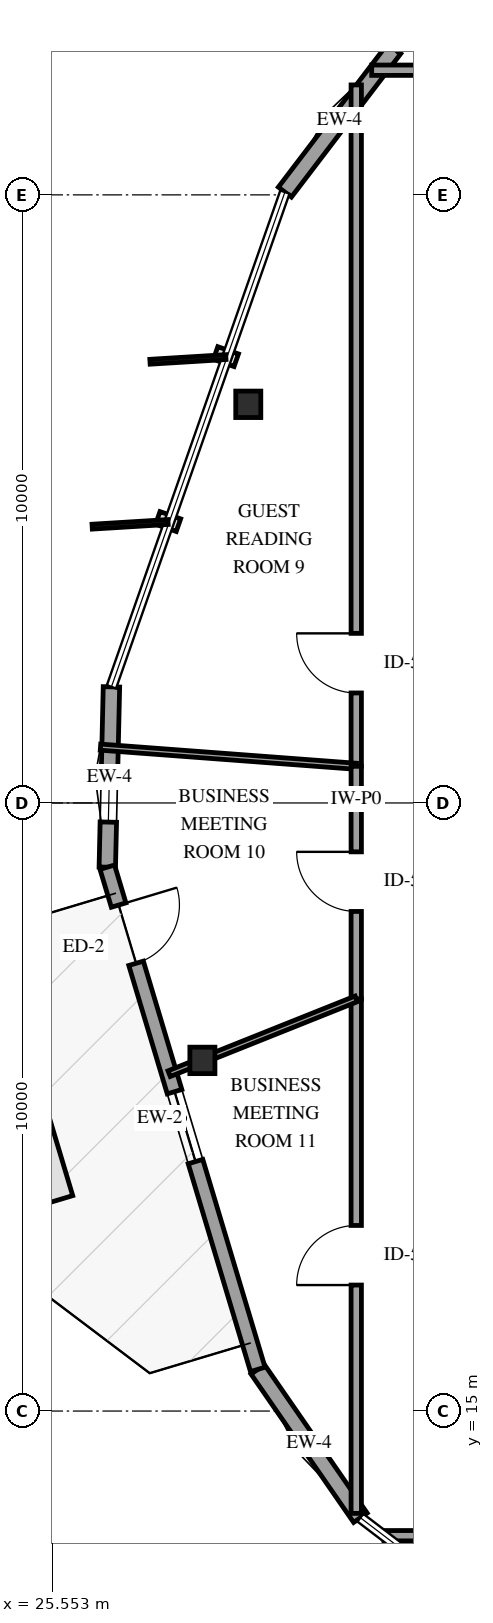
"""IFC4 building model, lengths in metres.
Left out: names, types, materials, properties, quantities, classifications, styles, units other than length and angle.
Written with IfcOpenShell. Run it as: python <this file> out.ifc"""

import sys

from ifc_helpers import new_model, si_unit, direction, frame, frame_2d, origin, origin_2d, place, context, subcontext, project, spatial, rectangle, i_section, extrude, element, fill, save


model = new_model("IFC4")
c1 = context("Model", 3, precision=1e-05, world=origin(), true_north=direction((0.0, 1.0)))
c2 = subcontext(c1, "Body", "Model", "MODEL_VIEW")
j1 = project(units=[si_unit("LENGTHUNIT", "METRE"), si_unit("PLANEANGLEUNIT", "RADIAN")], contexts=[c1])
p1 = place(None, origin())
s1 = spatial("IfcSite", under=j1, at=p1, CompositionType="ELEMENT")
p2 = place(p1, origin())
s2 = spatial("IfcBuilding", under=s1, at=p2, CompositionType="ELEMENT")
p3 = place(p2, frame((0.0, 0.0, 160.6)))
s3 = spatial("IfcBuildingStorey", under=s2, at=p3, CompositionType="ELEMENT", Elevation=160.6)
for number, where, z_axis, x_axis in (
    (1, (28.774, 31.556, 0.0), (0.0, 0.0, 1.0), (1.0, 0.0, 0.0)),
    (2, (28.02, 20.766, 0.0), (0.0, 0.0, 1.0), (1.0, 0.0, 0.0)),
):
    element("IfcColumn", number, at=place(p3, frame(where, z_axis=z_axis, x_axis=x_axis)), inside=s3, PredefinedType="COLUMN", context=c2, shape_type="SweptSolid", body=[
        extrude(i_section(OverallWidth=0.412, OverallDepth=0.435, WebThickness=0.036, FlangeThickness=0.057, FilletRadius=0.038, at=origin_2d()), origin(), (0.0, 0.0, 1.0), 3.6),
    ])
p4 = place(p3, frame((31.175, 37.405, 0.0), z_axis=(0.0, 0.0, 1.0), x_axis=(-0.606288663224, -0.795244652196, 0.0)))
e3 = element("IfcWall", 3, at=p4, inside=s3, PredefinedType="SOLIDWALL", context=c2, shape_type="SweptSolid", body=[
    extrude(rectangle(XDim=2.967, YDim=0.27, at=frame_2d((1.483, 0.0))), origin(), (0.0, 0.0, 1.0), 2.679),
])
p5 = place(p3, frame((26.524, 26.909, 0.0), z_axis=(0.0, 0.0, 1.0), x_axis=(-0.023042941499, -0.999734476172, 0.0)))
e4 = element("IfcWall", 4, at=p5, inside=s3, PredefinedType="SOLIDWALL", context=c2, shape_type="SweptSolid", body=[
    extrude(rectangle(XDim=2.967, YDim=0.27, at=frame_2d((1.483, 0.0))), origin(), (0.0, 0.0, 1.0), 2.679),
])
p6 = place(p5, frame((1.325, 0.0, 0.75)))
e5 = element("IfcOpeningElement", 5, at=p6, cuts=e4, PredefinedType="OPENING", context=c2, shape_type="SweptSolid", body=[
    extrude(rectangle(XDim=0.9, YDim=1.5, at=frame_2d((0.45, 0.75))), frame((0.0, 0.145, 0.0), z_axis=(0.0, -1.0, 0.0), x_axis=(1.0, 0.0, 0.0)), (0.0, 0.0, 1.0), 0.29),
])
p7 = place(p3, frame((28.93, 15.685, 0.0), z_axis=(0.0, 0.0, 1.0), x_axis=(0.569013104062, -0.822328454698, 0.0)))
e6 = element("IfcWall", 6, at=p7, inside=s3, PredefinedType="SOLIDWALL", context=c2, shape_type="SweptSolid", body=[
    extrude(rectangle(XDim=2.967, YDim=0.27, at=frame_2d((1.483, 0.0))), origin(), (0.0, 0.0, 1.0), 2.679),
])
p8 = place(p3, frame((26.456, 23.944, 0.0), z_axis=(0.0, 0.0, 1.0), x_axis=(0.287025725788, -0.957922874106, 0.0)))
e7 = element("IfcWall", 7, at=p8, inside=s3, PredefinedType="SOLIDWALL", context=c2, shape_type="SweptSolid", body=[
    extrude(rectangle(XDim=8.622, YDim=0.25, at=frame_2d((4.311, 0.0))), origin(), (0.0, 0.0, 1.0), 2.679),
])
p9 = place(p8, frame((0.65, 0.0, 0.0)))
e8 = element("IfcOpeningElement", 8, at=p9, cuts=e7, PredefinedType="OPENING", context=c2, shape_type="SweptSolid", body=[
    extrude(rectangle(XDim=1.0, YDim=2.15, at=frame_2d((0.5, 1.075))), frame((0.0, 0.135, 0.0), z_axis=(0.0, -1.0, 0.0), x_axis=(1.0, 0.0, 0.0)), (0.0, 0.0, 1.0), 0.27),
])
p10 = place(p8, frame((3.854, 0.0, 0.72)))
e9 = element("IfcOpeningElement", 9, at=p10, cuts=e7, PredefinedType="OPENING", context=c2, shape_type="SweptSolid", body=[
    extrude(rectangle(XDim=1.2, YDim=1.6, at=frame_2d((0.6, 0.8))), frame((0.0, 0.135, 0.0), z_axis=(0.0, -1.0, 0.0), x_axis=(1.0, 0.0, 0.0)), (0.0, 0.0, 1.0), 0.27),
])
p11 = place(p3, frame((30.55, 25.603, 0.0), z_axis=(0.0, 0.0, 1.0), x_axis=(0.0, 1.0, 0.0)))
e10 = element("IfcWall", 10, at=p11, inside=s3, PredefinedType="PARTITIONING", context=c2, shape_type="SweptSolid", body=[
    extrude(rectangle(XDim=11.205, YDim=0.17, at=frame_2d((5.603, 0.0))), origin(), (0.0, 0.0, 1.0), 3.3),
])
p12 = place(p11, frame((1.206, 0.0, 0.0)))
e11 = element("IfcOpeningElement", 11, at=p12, cuts=e10, PredefinedType="OPENING", context=c2, shape_type="SweptSolid", body=[
    extrude(rectangle(XDim=0.98, YDim=2.15, at=frame_2d((0.49, 1.075))), frame((0.0, 0.095, 0.0), z_axis=(0.0, -1.0, 0.0), x_axis=(1.0, 0.0, 0.0)), (0.0, 0.0, 1.0), 0.19),
])
p13 = place(p3, frame((30.55, 13.317, 0.0), z_axis=(0.0, 0.0, 1.0), x_axis=(0.0, 1.0, 0.0)))
e12 = element("IfcWall", 12, at=p13, inside=s3, PredefinedType="PARTITIONING", context=c2, shape_type="SweptSolid", body=[
    extrude(rectangle(XDim=8.461, YDim=0.17, at=frame_2d((4.23, 0.0))), origin(), (0.0, 0.0, 1.0), 3.3),
])
p14 = place(p13, frame((3.755, 0.0, 0.0)))
e13 = element("IfcOpeningElement", 13, at=p14, cuts=e12, PredefinedType="OPENING", context=c2, shape_type="SweptSolid", body=[
    extrude(rectangle(XDim=0.98, YDim=2.15, at=frame_2d((0.49, 1.075))), frame((0.0, 0.095, 0.0), z_axis=(0.0, -1.0, 0.0), x_axis=(1.0, 0.0, 0.0)), (0.0, 0.0, 1.0), 0.19),
])
p15 = place(p3, frame((38.405, 12.95, 0.0), z_axis=(0.0, 0.0, 1.0), x_axis=(-1.0, 0.0, 0.0)))
e14 = element("IfcWall", 14, at=p15, inside=s3, PredefinedType="PARTITIONING", context=c2, shape_type="SweptSolid", body=[
    extrude(rectangle(XDim=7.399, YDim=0.17, at=frame_2d((3.699, 0.0))), origin(), (0.0, 0.0, 1.0), 3.3),
])
p16 = place(p15, frame((0.635, 0.0, 0.0)))
e15 = element("IfcOpeningElement", 15, at=p16, cuts=e14, PredefinedType="OPENING", context=c2, shape_type="SweptSolid", body=[
    extrude(rectangle(XDim=0.98, YDim=2.15, at=frame_2d((0.49, 1.075))), frame((0.0, 0.095, 0.0), z_axis=(0.0, -1.0, 0.0), x_axis=(1.0, 0.0, 0.0)), (0.0, 0.0, 1.0), 0.19),
])
p17 = place(p3, frame((30.804, 37.05, 0.0), z_axis=(0.0, 0.0, 1.0), x_axis=(1.0, 0.0, 0.0)))
e16 = element("IfcWall", 16, at=p17, inside=s3, PredefinedType="PARTITIONING", context=c2, shape_type="SweptSolid", body=[
    extrude(rectangle(XDim=5.463, YDim=0.17, at=frame_2d((2.731, 0.0))), origin(), (0.0, 0.0, 1.0), 3.3),
])
p18 = place(p17, frame((2.257, 0.0, 0.0)))
e17 = element("IfcOpeningElement", 17, at=p18, cuts=e16, PredefinedType="OPENING", context=c2, shape_type="SweptSolid", body=[
    extrude(rectangle(XDim=0.98, YDim=2.15, at=frame_2d((0.49, 1.075))), frame((0.0, 0.095, 0.0), z_axis=(0.0, -1.0, 0.0), x_axis=(1.0, 0.0, 0.0)), (0.0, 0.0, 1.0), 0.19),
])
p19 = place(p3, frame((30.55, 25.603, 0.0), z_axis=(0.0, 0.0, 1.0), x_axis=(-0.997208368142, 0.074669073305, 0.0)))
e18 = element("IfcWall", 18, at=p19, inside=s3, PredefinedType="PARTITIONING", context=c2, shape_type="SweptSolid", body=[
    extrude(rectangle(XDim=4.218, YDim=0.1, at=frame_2d((2.109, 0.0))), origin(), (0.0, 0.0, 1.0), 3.3),
])
p20 = place(p3, frame((30.55, 21.778, 0.0), z_axis=(0.0, 0.0, 1.0), x_axis=(0.0, 1.0, 0.0)))
e19 = element("IfcWall", 19, at=p20, inside=s3, PredefinedType="PARTITIONING", context=c2, shape_type="SweptSolid", body=[
    extrude(rectangle(XDim=3.825, YDim=0.17, at=frame_2d((1.913, 0.0))), origin(), (0.0, 0.0, 1.0), 3.3),
])
p21 = place(p20, frame((1.438, 0.0, 0.0)))
e20 = element("IfcOpeningElement", 20, at=p21, cuts=e19, PredefinedType="OPENING", context=c2, shape_type="SweptSolid", body=[
    extrude(rectangle(XDim=0.98, YDim=2.15, at=frame_2d((0.49, 1.075))), frame((0.0, 0.095, 0.0), z_axis=(0.0, -1.0, 0.0), x_axis=(1.0, 0.0, 0.0)), (0.0, 0.0, 1.0), 0.19),
])
p22 = place(p3, frame((30.55, 21.778, 0.0), z_axis=(0.0, 0.0, 1.0), x_axis=(-0.928568118244, -0.371162026318, 0.0)))
e21 = element("IfcWall", 21, at=p22, inside=s3, PredefinedType="PARTITIONING", context=c2, shape_type="SweptSolid", body=[
    extrude(rectangle(XDim=3.314, YDim=0.1, at=frame_2d((1.657, 0.0))), origin(), (0.0, 0.0, 1.0), 3.3),
])
p23 = place(p6, origin())
e22 = element("IfcWindow", 22, at=p23, inside=s3, PartitioningType="SINGLE_PANEL", PredefinedType="WINDOW", context=c2, shape_type="SweptSolid", body=[
    extrude(rectangle(XDim=0.9, YDim=1.5, at=frame_2d((0.45, 0.75))), frame((0.0, 0.03, 0.0), z_axis=(0.0, -1.0, 0.0), x_axis=(1.0, 0.0, 0.0)), (0.0, 0.0, 1.0), 0.06),
])
fill(e5, e22)
p24 = place(p9, origin())
e23 = element("IfcDoor", 23, at=p24, inside=s3, OperationType="SINGLE_SWING_LEFT", PredefinedType="DOOR", context=c2, shape_type="SweptSolid", body=[
    extrude(rectangle(XDim=1.0, YDim=2.15, at=frame_2d((0.5, 1.075))), frame((0.0, 0.025, 0.0), z_axis=(0.0, -1.0, 0.0), x_axis=(1.0, 0.0, 0.0)), (0.0, 0.0, 1.0), 0.05),
])
fill(e8, e23)
p25 = place(p10, origin())
e24 = element("IfcWindow", 24, at=p25, inside=s3, PartitioningType="SINGLE_PANEL", PredefinedType="WINDOW", context=c2, shape_type="SweptSolid", body=[
    extrude(rectangle(XDim=1.2, YDim=1.6, at=frame_2d((0.6, 0.8))), frame((0.0, 0.03, 0.0), z_axis=(0.0, -1.0, 0.0), x_axis=(1.0, 0.0, 0.0)), (0.0, 0.0, 1.0), 0.06),
])
fill(e9, e24)
p26 = place(p12, origin())
e25 = element("IfcDoor", 25, at=p26, inside=s3, OperationType="SINGLE_SWING_RIGHT", PredefinedType="DOOR", context=c2, shape_type="SweptSolid", body=[
    extrude(rectangle(XDim=0.98, YDim=2.15, at=frame_2d((0.49, 1.075))), frame((0.0, 0.025, 0.0), z_axis=(0.0, -1.0, 0.0), x_axis=(1.0, 0.0, 0.0)), (0.0, 0.0, 1.0), 0.05),
])
fill(e11, e25)
p27 = place(p14, origin())
e26 = element("IfcDoor", 26, at=p27, inside=s3, OperationType="SINGLE_SWING_LEFT", PredefinedType="DOOR", context=c2, shape_type="SweptSolid", body=[
    extrude(rectangle(XDim=0.98, YDim=2.15, at=frame_2d((0.49, 1.075))), frame((0.0, 0.025, 0.0), z_axis=(0.0, -1.0, 0.0), x_axis=(1.0, 0.0, 0.0)), (0.0, 0.0, 1.0), 0.05),
])
fill(e13, e26)
p28 = place(p21, origin())
e27 = element("IfcDoor", 27, at=p28, inside=s3, OperationType="SINGLE_SWING_RIGHT", PredefinedType="DOOR", context=c2, shape_type="SweptSolid", body=[
    extrude(rectangle(XDim=0.98, YDim=2.15, at=frame_2d((0.49, 1.075))), frame((0.0, 0.025, 0.0), z_axis=(0.0, -1.0, 0.0), x_axis=(1.0, 0.0, 0.0)), (0.0, 0.0, 1.0), 0.05),
])
fill(e20, e27)
save(model, sys.argv[1])
